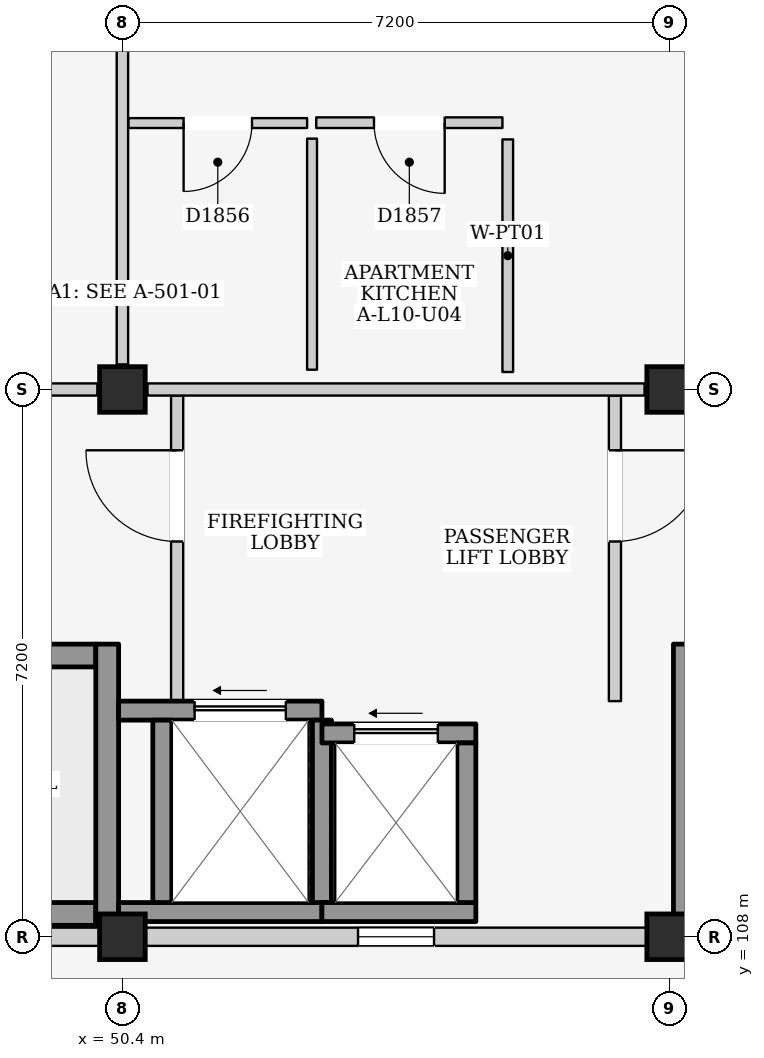
"""IFC4 building model, lengths in metres.
Left out: names, types, materials, properties, quantities, classifications, styles, units other than length and angle.
Written with IfcOpenShell. Run it as: python <this file> out.ifc"""

import sys

from ifc_helpers import new_model, si_unit, direction, frame, frame_2d, origin, origin_2d, place, context, subcontext, project, spatial, rectangle, extrude, element, fill, save


model = new_model("IFC4")
c1 = context("Model", 3, precision=1e-05, world=origin(), true_north=direction((0.0, 1.0)))
c2 = subcontext(c1, "Body", "Model", "MODEL_VIEW")
j1 = project(units=[si_unit("LENGTHUNIT", "METRE"), si_unit("PLANEANGLEUNIT", "RADIAN")], contexts=[c1])
p1 = place(None, origin())
s1 = spatial("IfcSite", under=j1, at=p1, CompositionType="ELEMENT")
p2 = place(p1, origin())
s2 = spatial("IfcBuilding", under=s1, at=p2, CompositionType="ELEMENT")
p3 = place(p2, frame((0.0, 0.0, 34.8)))
s3 = spatial("IfcBuildingStorey", under=s2, at=p3, CompositionType="ELEMENT", Elevation=34.8)
for number, where, z_axis, x_axis in (
    (1, (50.4, 108.0, 0.0), (0.0, 0.0, 1.0), (1.0, 0.0, 0.0)),
    (2, (50.4, 115.2, 0.0), (0.0, 0.0, 1.0), (1.0, 0.0, 0.0)),
    (3, (57.6, 108.0, 0.0), (0.0, 0.0, 1.0), (1.0, 0.0, 0.0)),
    (4, (57.6, 115.2, 0.0), (0.0, 0.0, 1.0), (1.0, 0.0, 0.0)),
):
    element("IfcColumn", number, at=place(p3, frame(where, z_axis=z_axis, x_axis=x_axis)), inside=s3, PredefinedType="COLUMN", context=c2, shape_type="SweptSolid", body=[
        extrude(rectangle(XDim=0.6, YDim=0.6, at=origin_2d()), origin(), (0.0, 0.0, 1.0), 3.2),
    ])
p4 = place(p3, frame((43.5, 108.0, 0.0), z_axis=(0.0, 0.0, 1.0), x_axis=(1.0, 0.0, 0.0)))
e5 = element("IfcWall", 5, at=p4, inside=s3, PredefinedType="ELEMENTEDWALL", context=c2, shape_type="SweptSolid", body=[
    extrude(rectangle(XDim=6.6, YDim=0.24, at=frame_2d((3.3, 0.0))), origin(), (0.0, 0.0, 1.0), 2.295),
])
p5 = place(p4, frame((2.8, 0.0, 1.2)))
e6 = element("IfcOpeningElement", 6, at=p5, cuts=e5, PredefinedType="OPENING", context=c2, shape_type="SweptSolid", body=[
    extrude(rectangle(XDim=1.0, YDim=0.9, at=frame_2d((0.5, 0.45))), frame((0.0, 0.135, 0.0), z_axis=(0.0, -1.0, 0.0), x_axis=(1.0, 0.0, 0.0)), (0.0, 0.0, 1.0), 0.27),
])
p6 = place(p3, frame((50.7, 108.0, 0.0), z_axis=(0.0, 0.0, 1.0), x_axis=(1.0, 0.0, 0.0)))
e7 = element("IfcWall", 7, at=p6, inside=s3, PredefinedType="ELEMENTEDWALL", context=c2, shape_type="SweptSolid", body=[
    extrude(rectangle(XDim=6.6, YDim=0.24, at=frame_2d((3.3, 0.0))), origin(), (0.0, 0.0, 1.0), 2.295),
])
p7 = place(p6, frame((2.8, 0.0, 1.2)))
e8 = element("IfcOpeningElement", 8, at=p7, cuts=e7, PredefinedType="OPENING", context=c2, shape_type="SweptSolid", body=[
    extrude(rectangle(XDim=1.0, YDim=0.9, at=frame_2d((0.5, 0.45))), frame((0.0, 0.135, 0.0), z_axis=(0.0, -1.0, 0.0), x_axis=(1.0, 0.0, 0.0)), (0.0, 0.0, 1.0), 0.27),
])
p8 = place(p3, frame((43.55, 108.3, 0.0), z_axis=(0.0, 0.0, 1.0), x_axis=(1.0, 0.0, 0.0)))
e9 = element("IfcWall", 9, at=p8, inside=s3, PredefinedType="SHEAR", context=c2, shape_type="SweptSolid", body=[
    extrude(rectangle(XDim=6.5, YDim=0.3, at=frame_2d((3.25, 0.0))), origin(), (0.0, 0.0, 1.0), 2.96),
])
p9 = place(p3, frame((43.55, 111.7, 0.0), z_axis=(0.0, 0.0, 1.0), x_axis=(1.0, 0.0, 0.0)))
e10 = element("IfcWall", 10, at=p9, inside=s3, PredefinedType="SHEAR", context=c2, shape_type="SweptSolid", body=[
    extrude(rectangle(XDim=6.5, YDim=0.3, at=frame_2d((3.25, 0.0))), origin(), (0.0, 0.0, 1.0), 2.96),
])
p10 = place(p9, frame((0.18, 0.0, 0.0)))
e11 = element("IfcOpeningElement", 11, at=p10, cuts=e10, PredefinedType="OPENING", context=c2, shape_type="SweptSolid", body=[
    extrude(rectangle(XDim=1.15, YDim=2.2, at=frame_2d((0.575, 1.1))), frame((0.0, 0.165, 0.0), z_axis=(0.0, -1.0, 0.0), x_axis=(1.0, 0.0, 0.0)), (0.0, 0.0, 1.0), 0.33),
])
p11 = place(p3, frame((50.2, 108.15, 0.0), z_axis=(0.0, 0.0, 1.0), x_axis=(0.0, 1.0, 0.0)))
e12 = element("IfcWall", 12, at=p11, inside=s3, PredefinedType="SHEAR", context=c2, shape_type="SweptSolid", body=[
    extrude(rectangle(XDim=3.7, YDim=0.3, at=frame_2d((1.85, 0.0))), origin(), (0.0, 0.0, 1.0), 2.96),
])
p12 = place(p3, frame((51.12, 111.1, 0.0), z_axis=(0.0, 0.0, 1.0), x_axis=(0.0, 1.0, 0.0)))
e13 = element("IfcWall", 13, at=p12, inside=s3, PredefinedType="PARTITIONING", context=c2, shape_type="SweptSolid", body=[
    extrude(rectangle(XDim=4.02, YDim=0.16, at=frame_2d((2.01, 0.0))), origin(), (0.0, 0.0, 1.0), 2.96),
])
p13 = place(p12, frame((2.1, 0.0, 0.0)))
e14 = element("IfcOpeningElement", 14, at=p13, cuts=e13, PredefinedType="OPENING", context=c2, shape_type="SweptSolid", body=[
    extrude(rectangle(XDim=1.2, YDim=2.2, at=frame_2d((0.6, 1.1))), frame((0.0, 0.095, 0.0), z_axis=(0.0, -1.0, 0.0), x_axis=(1.0, 0.0, 0.0)), (0.0, 0.0, 1.0), 0.19),
])
p14 = place(p3, frame((56.88, 111.1, 0.0), z_axis=(0.0, 0.0, 1.0), x_axis=(0.0, 1.0, 0.0)))
e15 = element("IfcWall", 15, at=p14, inside=s3, PredefinedType="PARTITIONING", context=c2, shape_type="SweptSolid", body=[
    extrude(rectangle(XDim=4.02, YDim=0.16, at=frame_2d((2.01, 0.0))), origin(), (0.0, 0.0, 1.0), 2.96),
])
p15 = place(p14, frame((2.1, 0.0, 0.0)))
e16 = element("IfcOpeningElement", 16, at=p15, cuts=e15, PredefinedType="OPENING", context=c2, shape_type="SweptSolid", body=[
    extrude(rectangle(XDim=1.2, YDim=2.2, at=frame_2d((0.6, 1.1))), frame((0.0, 0.095, 0.0), z_axis=(0.0, -1.0, 0.0), x_axis=(1.0, 0.0, 0.0)), (0.0, 0.0, 1.0), 0.19),
])
p16 = place(p3, frame((50.35, 108.325, 0.0), z_axis=(0.0, 0.0, 1.0), x_axis=(1.0, 0.0, 0.0)))
e17 = element("IfcWall", 17, at=p16, inside=s3, PredefinedType="SHEAR", context=c2, shape_type="SweptSolid", body=[
    extrude(rectangle(XDim=2.675, YDim=0.25, at=frame_2d((1.337, 0.0))), origin(), (0.0, 0.0, 1.0), 2.96),
])
p17 = place(p3, frame((50.35, 110.975, 0.0), z_axis=(0.0, 0.0, 1.0), x_axis=(1.0, 0.0, 0.0)))
e18 = element("IfcWall", 18, at=p17, inside=s3, PredefinedType="SHEAR", context=c2, shape_type="SweptSolid", body=[
    extrude(rectangle(XDim=2.675, YDim=0.25, at=frame_2d((1.337, 0.0))), origin(), (0.0, 0.0, 1.0), 2.96),
])
p18 = place(p17, frame((1.0, 0.0, 0.0)))
e19 = element("IfcOpeningElement", 19, at=p18, cuts=e18, PredefinedType="OPENING", context=c2, shape_type="SweptSolid", body=[
    extrude(rectangle(XDim=1.2, YDim=2.25, at=frame_2d((0.6, 1.125))), frame((0.0, 0.14, 0.0), z_axis=(0.0, -1.0, 0.0), x_axis=(1.0, 0.0, 0.0)), (0.0, 0.0, 1.0), 0.28),
])
for number, where, z_axis, x_axis in (
    (20, (50.925, 108.45, 0.0), (0.0, 0.0, 1.0), (0.0, 1.0, 0.0)),
    (21, (53.025, 108.45, 0.0), (0.0, 0.0, 1.0), (0.0, 1.0, 0.0)),
):
    element("IfcWall", number, at=place(p3, frame(where, z_axis=z_axis, x_axis=x_axis)), inside=s3, PredefinedType="SHEAR", context=c2, shape_type="SweptSolid", body=[
        extrude(rectangle(XDim=2.4, YDim=0.25, at=frame_2d((1.2, 0.0))), origin(), (0.0, 0.0, 1.0), 2.96),
    ])
p19 = place(p3, frame((53.025, 108.325, 0.0), z_axis=(0.0, 0.0, 1.0), x_axis=(1.0, 0.0, 0.0)))
e22 = element("IfcWall", 22, at=p19, inside=s3, PredefinedType="SHEAR", context=c2, shape_type="SweptSolid", body=[
    extrude(rectangle(XDim=2.025, YDim=0.25, at=frame_2d((1.013, 0.0))), origin(), (0.0, 0.0, 1.0), 2.96),
])
p20 = place(p3, frame((53.025, 110.675, 0.0), z_axis=(0.0, 0.0, 1.0), x_axis=(1.0, 0.0, 0.0)))
e23 = element("IfcWall", 23, at=p20, inside=s3, PredefinedType="SHEAR", context=c2, shape_type="SweptSolid", body=[
    extrude(rectangle(XDim=2.025, YDim=0.25, at=frame_2d((1.013, 0.0))), origin(), (0.0, 0.0, 1.0), 2.96),
])
p21 = place(p20, frame((0.425, 0.0, 0.0)))
e24 = element("IfcOpeningElement", 24, at=p21, cuts=e23, PredefinedType="OPENING", context=c2, shape_type="SweptSolid", body=[
    extrude(rectangle(XDim=1.1, YDim=2.15, at=frame_2d((0.55, 1.075))), frame((0.0, 0.14, 0.0), z_axis=(0.0, -1.0, 0.0), x_axis=(1.0, 0.0, 0.0)), (0.0, 0.0, 1.0), 0.28),
])
p22 = place(p3, frame((54.925, 108.45, 0.0), z_axis=(0.0, 0.0, 1.0), x_axis=(0.0, 1.0, 0.0)))
e25 = element("IfcWall", 25, at=p22, inside=s3, PredefinedType="SHEAR", context=c2, shape_type="SweptSolid", body=[
    extrude(rectangle(XDim=2.1, YDim=0.25, at=frame_2d((1.05, 0.0))), origin(), (0.0, 0.0, 1.0), 2.96),
])
p23 = place(p3, frame((57.8, 108.15, 0.0), z_axis=(0.0, 0.0, 1.0), x_axis=(0.0, 1.0, 0.0)))
e26 = element("IfcWall", 26, at=p23, inside=s3, PredefinedType="SHEAR", context=c2, shape_type="SweptSolid", body=[
    extrude(rectangle(XDim=3.7, YDim=0.3, at=frame_2d((1.85, 0.0))), origin(), (0.0, 0.0, 1.0), 2.96),
])
p24 = place(p3, frame((43.53, 115.2, 0.0), z_axis=(0.0, 0.0, 1.0), x_axis=(1.0, 0.0, 0.0)))
e27 = element("IfcWall", 27, at=p24, inside=s3, PredefinedType="PARTITIONING", context=c2, shape_type="SweptSolid", body=[
    extrude(rectangle(XDim=6.54, YDim=0.16, at=frame_2d((3.27, 0.0))), origin(), (0.0, 0.0, 1.0), 2.295),
])
p25 = place(p24, frame((2.77, 0.0, 0.0)))
e28 = element("IfcOpeningElement", 28, at=p25, cuts=e27, PredefinedType="OPENING", context=c2, shape_type="SweptSolid", body=[
    extrude(rectangle(XDim=1.0, YDim=2.15, at=frame_2d((0.5, 1.075))), frame((0.0, 0.095, 0.0), z_axis=(0.0, -1.0, 0.0), x_axis=(1.0, 0.0, 0.0)), (0.0, 0.0, 1.0), 0.19),
])
p26 = place(p3, frame((50.4, 115.53, 0.0), z_axis=(0.0, 0.0, 1.0), x_axis=(0.0, 1.0, 0.0)))
e29 = element("IfcWall", 29, at=p26, inside=s3, PredefinedType="PARTITIONING", context=c2, shape_type="SweptSolid", body=[
    extrude(rectangle(XDim=6.54, YDim=0.15, at=frame_2d((3.27, 0.0))), origin(), (0.0, 0.0, 1.0), 2.445),
])
p27 = place(p3, frame((50.73, 115.2, 0.0), z_axis=(0.0, 0.0, 1.0), x_axis=(1.0, 0.0, 0.0)))
e30 = element("IfcWall", 30, at=p27, inside=s3, PredefinedType="PARTITIONING", context=c2, shape_type="SweptSolid", body=[
    extrude(rectangle(XDim=6.54, YDim=0.16, at=frame_2d((3.27, 0.0))), origin(), (0.0, 0.0, 1.0), 2.295),
])
p28 = place(p3, frame((50.48, 118.705, 0.0), z_axis=(0.0, 0.0, 1.0), x_axis=(1.0, 0.0, 0.0)))
e31 = element("IfcWall", 31, at=p28, inside=s3, PredefinedType="PARTITIONING", context=c2, shape_type="SweptSolid", body=[
    extrude(rectangle(XDim=2.35, YDim=0.13, at=frame_2d((1.175, 0.0))), origin(), (0.0, 0.0, 1.0), 2.96),
])
p29 = place(p28, frame((0.725, 0.0, 0.0)))
e32 = element("IfcOpeningElement", 32, at=p29, cuts=e31, PredefinedType="OPENING", context=c2, shape_type="SweptSolid", body=[
    extrude(rectangle(XDim=0.9, YDim=2.1, at=frame_2d((0.45, 1.05))), frame((0.0, 0.08, 0.0), z_axis=(0.0, -1.0, 0.0), x_axis=(1.0, 0.0, 0.0)), (0.0, 0.0, 1.0), 0.16),
])
p30 = place(p3, frame((52.895, 115.46, 0.0), z_axis=(0.0, 0.0, 1.0), x_axis=(0.0, 1.0, 0.0)))
e33 = element("IfcWall", 33, at=p30, inside=s3, PredefinedType="PARTITIONING", context=c2, shape_type="SweptSolid", body=[
    extrude(rectangle(XDim=3.04, YDim=0.13, at=frame_2d((1.52, 0.0))), origin(), (0.0, 0.0, 1.0), 2.96),
])
p31 = place(p3, frame((52.95, 118.71, 0.0), z_axis=(0.0, 0.0, 1.0), x_axis=(1.0, 0.0, 0.0)))
e34 = element("IfcWall", 34, at=p31, inside=s3, PredefinedType="PARTITIONING", context=c2, shape_type="SweptSolid", body=[
    extrude(rectangle(XDim=2.45, YDim=0.14, at=frame_2d((1.225, 0.0))), origin(), (0.0, 0.0, 1.0), 2.96),
])
p32 = place(p31, frame((0.76, 0.0, 0.0)))
e35 = element("IfcOpeningElement", 35, at=p32, cuts=e34, PredefinedType="OPENING", context=c2, shape_type="SweptSolid", body=[
    extrude(rectangle(XDim=0.93, YDim=2.14, at=frame_2d((0.465, 1.07))), frame((0.0, 0.085, 0.0), z_axis=(0.0, -1.0, 0.0), x_axis=(1.0, 0.0, 0.0)), (0.0, 0.0, 1.0), 0.17),
])
p33 = place(p3, frame((55.47, 115.43, 0.0), z_axis=(0.0, 0.0, 1.0), x_axis=(0.0, 1.0, 0.0)))
e36 = element("IfcWall", 36, at=p33, inside=s3, PredefinedType="PARTITIONING", context=c2, shape_type="SweptSolid", body=[
    extrude(rectangle(XDim=3.06, YDim=0.14, at=frame_2d((1.53, 0.0))), origin(), (0.0, 0.0, 1.0), 2.96),
])
p34 = place(p7, origin())
e37 = element("IfcWindow", 37, at=p34, inside=s3, PartitioningType="SINGLE_PANEL", PredefinedType="WINDOW", context=c2, shape_type="SweptSolid", body=[
    extrude(rectangle(XDim=1.0, YDim=0.9, at=frame_2d((0.5, 0.45))), frame((0.0, 0.03, 0.0), z_axis=(0.0, -1.0, 0.0), x_axis=(1.0, 0.0, 0.0)), (0.0, 0.0, 1.0), 0.06),
])
fill(e8, e37)
p35 = place(p13, origin())
e38 = element("IfcDoor", 38, at=p35, inside=s3, OperationType="SINGLE_SWING_RIGHT", PredefinedType="DOOR", context=c2, shape_type="SweptSolid", body=[
    extrude(rectangle(XDim=1.2, YDim=2.2, at=frame_2d((0.6, 1.1))), frame((0.0, 0.025, 0.0), z_axis=(0.0, -1.0, 0.0), x_axis=(1.0, 0.0, 0.0)), (0.0, 0.0, 1.0), 0.05),
])
fill(e14, e38)
p36 = place(p15, frame((1.2, 0.0, 0.0), z_axis=(0.0, 0.0, 1.0), x_axis=(-1.0, 0.0, 0.0)))
e39 = element("IfcDoor", 39, at=p36, inside=s3, OperationType="SINGLE_SWING_LEFT", PredefinedType="DOOR", context=c2, shape_type="SweptSolid", body=[
    extrude(rectangle(XDim=1.2, YDim=2.2, at=frame_2d((0.6, 1.1))), frame((0.0, 0.025, 0.0), z_axis=(0.0, -1.0, 0.0), x_axis=(1.0, 0.0, 0.0)), (0.0, 0.0, 1.0), 0.05),
])
fill(e16, e39)
p37 = place(p18, origin())
e40 = element("IfcDoor", 40, at=p37, inside=s3, OperationType="SLIDING_TO_LEFT", PredefinedType="DOOR", context=c2, shape_type="SweptSolid", body=[
    extrude(rectangle(XDim=1.2, YDim=2.25, at=frame_2d((0.6, 1.125))), frame((0.0, 0.025, 0.0), z_axis=(0.0, -1.0, 0.0), x_axis=(1.0, 0.0, 0.0)), (0.0, 0.0, 1.0), 0.05),
])
fill(e19, e40)
p38 = place(p21, origin())
e41 = element("IfcDoor", 41, at=p38, inside=s3, OperationType="SLIDING_TO_LEFT", PredefinedType="DOOR", context=c2, shape_type="SweptSolid", body=[
    extrude(rectangle(XDim=1.1, YDim=2.15, at=frame_2d((0.55, 1.075))), frame((0.0, 0.025, 0.0), z_axis=(0.0, -1.0, 0.0), x_axis=(1.0, 0.0, 0.0)), (0.0, 0.0, 1.0), 0.05),
])
fill(e24, e41)
p39 = place(p29, frame((0.9, 0.0, 0.0), z_axis=(0.0, 0.0, 1.0), x_axis=(-1.0, 0.0, 0.0)))
e42 = element("IfcDoor", 42, at=p39, inside=s3, OperationType="SINGLE_SWING_RIGHT", PredefinedType="DOOR", context=c2, shape_type="SweptSolid", body=[
    extrude(rectangle(XDim=0.9, YDim=2.1, at=frame_2d((0.45, 1.05))), frame((0.0, 0.025, 0.0), z_axis=(0.0, -1.0, 0.0), x_axis=(1.0, 0.0, 0.0)), (0.0, 0.0, 1.0), 0.05),
])
fill(e32, e42)
p40 = place(p32, frame((0.93, 0.0, 0.0), z_axis=(0.0, 0.0, 1.0), x_axis=(-1.0, 0.0, 0.0)))
e43 = element("IfcDoor", 43, at=p40, inside=s3, OperationType="SINGLE_SWING_LEFT", PredefinedType="DOOR", context=c2, shape_type="SweptSolid", body=[
    extrude(rectangle(XDim=0.93, YDim=2.14, at=frame_2d((0.465, 1.07))), frame((0.0, 0.025, 0.0), z_axis=(0.0, -1.0, 0.0), x_axis=(1.0, 0.0, 0.0)), (0.0, 0.0, 1.0), 0.05),
])
fill(e35, e43)
save(model, sys.argv[1])
